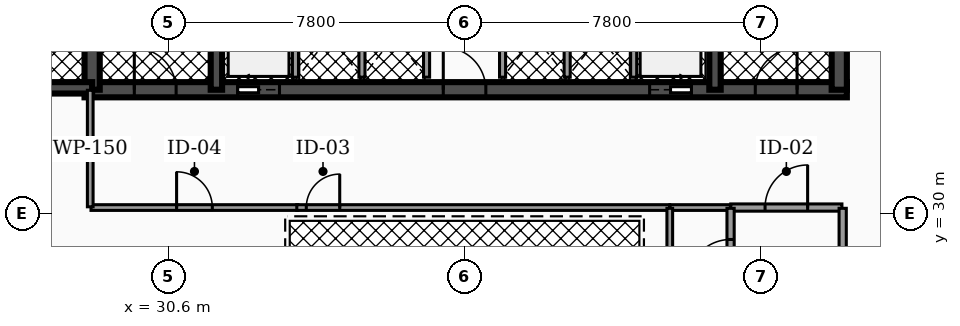
"""IFC4 building model, lengths in metres.
Left out: names, types, materials, properties, quantities, classifications, styles, units other than length and angle.
Written with IfcOpenShell. Run it as: python <this file> out.ifc"""

import sys

from ifc_helpers import new_model, si_unit, direction, frame, frame_2d, origin, place, context, subcontext, project, spatial, rectangle, extrude, element, fill, save


model = new_model("IFC4")
c1 = context("Model", 3, precision=1e-05, world=origin(), true_north=direction((0.0, 1.0)))
c2 = subcontext(c1, "Body", "Model", "MODEL_VIEW")
j1 = project(units=[si_unit("LENGTHUNIT", "METRE"), si_unit("PLANEANGLEUNIT", "RADIAN")], contexts=[c1])
p1 = place(None, origin())
s1 = spatial("IfcSite", under=j1, at=p1, CompositionType="ELEMENT")
p2 = place(p1, origin())
s2 = spatial("IfcBuilding", under=s1, at=p2, CompositionType="ELEMENT")
p3 = place(p2, frame((0.0, 0.0, 96.9)))
s3 = spatial("IfcBuildingStorey", under=s2, at=p3, CompositionType="ELEMENT", Elevation=96.9)
p4 = place(p3, frame((28.4, 33.25, 0.0), z_axis=(0.0, 0.0, 1.0), x_axis=(1.0, 0.0, 0.0)))
e1 = element("IfcWall", 1, at=p4, inside=s3, PredefinedType="SHEAR", context=c2, shape_type="SweptSolid", body=[
    extrude(rectangle(XDim=20.06, YDim=0.4, at=frame_2d((10.03, 0.0))), origin(), (0.0, 0.0, 1.0), 3.82),
])
p5 = place(p4, frame((4.03, 0.0, 0.0)))
e2 = element("IfcOpeningElement", 2, at=p5, cuts=e1, PredefinedType="OPENING", context=c2, shape_type="SweptSolid", body=[
    extrude(rectangle(XDim=1.1, YDim=2.15, at=frame_2d((0.55, 1.075))), frame((0.0, 0.21, 0.0), z_axis=(0.0, -1.0, 0.0), x_axis=(1.0, 0.0, 0.0)), (0.0, 0.0, 1.0), 0.42),
])
p6 = place(p4, frame((14.87, 0.0, 0.0)))
e3 = element("IfcOpeningElement", 3, at=p6, cuts=e1, PredefinedType="OPENING", context=c2, shape_type="SweptSolid", body=[
    extrude(rectangle(XDim=1.1, YDim=2.15, at=frame_2d((0.55, 1.075))), frame((0.0, 0.21, 0.0), z_axis=(0.0, -1.0, 0.0), x_axis=(1.0, 0.0, 0.0)), (0.0, 0.0, 1.0), 0.42),
])
p7 = place(p4, frame((1.31, 0.0, 0.0)))
e4 = element("IfcOpeningElement", 4, at=p7, cuts=e1, PredefinedType="OPENING", context=c2, shape_type="SweptSolid", body=[
    extrude(rectangle(XDim=1.1, YDim=2.2, at=frame_2d((0.55, 1.1))), frame((0.0, 0.21, 0.0), z_axis=(0.0, -1.0, 0.0), x_axis=(1.0, 0.0, 0.0)), (0.0, 0.0, 1.0), 0.42),
])
p8 = place(p4, frame((9.44, 0.0, 0.0)))
e5 = element("IfcOpeningElement", 5, at=p8, cuts=e1, PredefinedType="OPENING", context=c2, shape_type="SweptSolid", body=[
    extrude(rectangle(XDim=1.12, YDim=2.05, at=frame_2d((0.56, 1.025))), frame((0.0, 0.21, 0.0), z_axis=(0.0, -1.0, 0.0), x_axis=(1.0, 0.0, 0.0)), (0.0, 0.0, 1.0), 0.42),
])
p9 = place(p4, frame((17.65, 0.0, 0.0)))
e6 = element("IfcOpeningElement", 6, at=p9, cuts=e1, PredefinedType="OPENING", context=c2, shape_type="SweptSolid", body=[
    extrude(rectangle(XDim=1.1, YDim=2.2, at=frame_2d((0.55, 1.1))), frame((0.0, 0.21, 0.0), z_axis=(0.0, -1.0, 0.0), x_axis=(1.0, 0.0, 0.0)), (0.0, 0.0, 1.0), 0.42),
])
p10 = place(p3, frame((28.6, 33.25, 0.0), z_axis=(0.0, 0.0, 1.0), x_axis=(0.0, 1.0, 0.0)))
e7 = element("IfcWall", 7, at=p10, inside=s3, PredefinedType="SHEAR", context=c2, shape_type="SweptSolid", body=[
    extrude(rectangle(XDim=10.2, YDim=0.4, at=frame_2d((5.1, 0.0))), origin(), (0.0, 0.0, 1.0), 3.82),
])
for number, where, z_axis, x_axis in (
    (8, (31.87, 33.25, 0.0), (0.0, 0.0, 1.0), (0.0, 1.0, 0.0)),
    (9, (44.99, 33.25, 0.0), (0.0, 0.0, 1.0), (0.0, 1.0, 0.0)),
):
    element("IfcWall", number, at=place(p3, frame(where, z_axis=z_axis, x_axis=x_axis)), inside=s3, PredefinedType="SHEAR", context=c2, shape_type="SweptSolid", body=[
        extrude(rectangle(XDim=10.2, YDim=0.3, at=frame_2d((5.1, 0.0))), origin(), (0.0, 0.0, 1.0), 3.82),
    ])
p11 = place(p3, frame((48.26, 33.25, 0.0), z_axis=(0.0, 0.0, 1.0), x_axis=(0.0, 1.0, 0.0)))
e10 = element("IfcWall", 10, at=p11, inside=s3, PredefinedType="SHEAR", context=c2, shape_type="SweptSolid", body=[
    extrude(rectangle(XDim=10.2, YDim=0.4, at=frame_2d((5.1, 0.0))), origin(), (0.0, 0.0, 1.0), 3.82),
])
p12 = place(p3, frame((25.08, 33.3, 0.0), z_axis=(0.0, 0.0, 1.0), x_axis=(1.0, 0.0, 0.0)))
e11 = element("IfcWall", 11, at=p12, inside=s3, PredefinedType="SHEAR", context=c2, shape_type="SweptSolid", body=[
    extrude(rectangle(XDim=3.52, YDim=0.3, at=frame_2d((1.76, 0.0))), origin(), (0.0, 0.0, 1.0), 3.82),
])
p13 = place(p12, frame((1.335, 0.0, 0.0)))
e12 = element("IfcOpeningElement", 12, at=p13, cuts=e11, PredefinedType="OPENING", context=c2, shape_type="SweptSolid", body=[
    extrude(rectangle(XDim=0.95, YDim=2.2, at=frame_2d((0.475, 1.1))), frame((0.0, 0.16, 0.0), z_axis=(0.0, -1.0, 0.0), x_axis=(1.0, 0.0, 0.0)), (0.0, 0.0, 1.0), 0.32),
])
for number, where, z_axis, x_axis in (
    (13, (33.95, 33.58, 0.0), (0.0, 0.0, 1.0), (0.0, 1.0, 0.0)),
    (14, (42.85, 33.58, 0.0), (0.0, 0.0, 1.0), (0.0, 1.0, 0.0)),
):
    element("IfcWall", number, at=place(p3, frame(where, z_axis=z_axis, x_axis=x_axis)), inside=s3, PredefinedType="SOLIDWALL", context=c2, shape_type="SweptSolid", body=[
        extrude(rectangle(XDim=2.45, YDim=0.16, at=frame_2d((1.225, 0.0))), origin(), (0.0, 0.0, 1.0), 2.792),
    ])
for number, where, z_axis, x_axis in (
    (15, (35.7, 33.58, 0.0), (0.0, 0.0, 1.0), (0.0, 1.0, 0.0)),
    (16, (37.4, 33.58, 0.0), (0.0, 0.0, 1.0), (0.0, 1.0, 0.0)),
    (17, (39.4, 33.58, 0.0), (0.0, 0.0, 1.0), (0.0, 1.0, 0.0)),
    (18, (41.1, 33.58, 0.0), (0.0, 0.0, 1.0), (0.0, 1.0, 0.0)),
):
    element("IfcWall", number, at=place(p3, frame(where, z_axis=z_axis, x_axis=x_axis)), inside=s3, PredefinedType="SOLIDWALL", context=c2, shape_type="SweptSolid", body=[
        extrude(rectangle(XDim=2.25, YDim=0.16, at=frame_2d((1.125, 0.0))), origin(), (0.0, 0.0, 1.0), 2.792),
    ])
p14 = place(p3, frame((45.405, 30.15, 0.0), z_axis=(0.0, 0.0, 1.0), x_axis=(1.0, 0.0, 0.0)))
e19 = element("IfcWall", 19, at=p14, inside=s3, PredefinedType="PARTITIONING", context=c2, shape_type="SweptSolid", body=[
    extrude(rectangle(XDim=2.925, YDim=0.19, at=frame_2d((1.462, 0.0))), origin(), (0.0, 0.0, 1.0), 2.777),
])
p15 = place(p14, frame((0.903, 0.0, 0.0)))
e20 = element("IfcOpeningElement", 20, at=p15, cuts=e19, PredefinedType="OPENING", context=c2, shape_type="SweptSolid", body=[
    extrude(rectangle(XDim=1.12, YDim=2.05, at=frame_2d((0.56, 1.025))), frame((0.0, 0.105, 0.0), z_axis=(0.0, -1.0, 0.0), x_axis=(1.0, 0.0, 0.0)), (0.0, 0.0, 1.0), 0.21),
])
p16 = place(p3, frame((43.805, 30.15, 0.0), z_axis=(0.0, 0.0, 1.0), x_axis=(1.0, 0.0, 0.0)))
e21 = element("IfcWall", 21, at=p16, inside=s3, PredefinedType="PARTITIONING", context=c2, shape_type="SweptSolid", body=[
    extrude(rectangle(XDim=1.59, YDim=0.15, at=frame_2d((0.795, 0.0))), origin(), (0.0, 0.0, 1.0), 2.777),
])
p17 = place(p3, frame((28.57, 30.15, 0.0), z_axis=(0.0, 0.0, 1.0), x_axis=(1.0, 0.0, 0.0)))
e22 = element("IfcWall", 22, at=p17, inside=s3, PredefinedType="PARTITIONING", context=c2, shape_type="SweptSolid", body=[
    extrude(rectangle(XDim=5.445, YDim=0.15, at=frame_2d((2.722, 0.0))), origin(), (0.0, 0.0, 1.0), 2.777),
])
p18 = place(p17, frame((2.252, 0.0, 0.0)))
e23 = element("IfcOpeningElement", 23, at=p18, cuts=e22, PredefinedType="OPENING", context=c2, shape_type="SweptSolid", body=[
    extrude(rectangle(XDim=0.94, YDim=2.05, at=frame_2d((0.47, 1.025))), frame((0.0, 0.085, 0.0), z_axis=(0.0, -1.0, 0.0), x_axis=(1.0, 0.0, 0.0)), (0.0, 0.0, 1.0), 0.17),
])
p19 = place(p3, frame((28.55, 30.17, 0.0), z_axis=(0.0, 0.0, 1.0), x_axis=(0.0, 1.0, 0.0)))
e24 = element("IfcWall", 24, at=p19, inside=s3, PredefinedType="PARTITIONING", context=c2, shape_type="SweptSolid", body=[
    extrude(rectangle(XDim=3.065, YDim=0.15, at=frame_2d((1.533, 0.0))), origin(), (0.0, 0.0, 1.0), 2.777),
])
p20 = place(p3, frame((33.985, 30.15, 0.0), z_axis=(0.0, 0.0, 1.0), x_axis=(1.0, 0.0, 0.0)))
e25 = element("IfcWall", 25, at=p20, inside=s3, PredefinedType="PARTITIONING", context=c2, shape_type="SweptSolid", body=[
    extrude(rectangle(XDim=9.81, YDim=0.15, at=frame_2d((4.905, 0.0))), origin(), (0.0, 0.0, 1.0), 2.777),
])
p21 = place(p20, frame((0.25, 0.0, 0.0)))
e26 = element("IfcOpeningElement", 26, at=p21, cuts=e25, PredefinedType="OPENING", context=c2, shape_type="SweptSolid", body=[
    extrude(rectangle(XDim=0.88, YDim=2.05, at=frame_2d((0.44, 1.025))), frame((0.0, 0.085, 0.0), z_axis=(0.0, -1.0, 0.0), x_axis=(1.0, 0.0, 0.0)), (0.0, 0.0, 1.0), 0.17),
])
p22 = place(p3, frame((45.4, 27.37, 0.0), z_axis=(0.0, 0.0, 1.0), x_axis=(0.0, 1.0, 0.0)))
e27 = element("IfcWall", 27, at=p22, inside=s3, PredefinedType="PARTITIONING", context=c2, shape_type="SweptSolid", body=[
    extrude(rectangle(XDim=2.76, YDim=0.19, at=frame_2d((1.38, 0.0))), origin(), (0.0, 0.0, 1.0), 2.777),
])
p23 = place(p22, frame((0.82, 0.0, 0.0)))
e28 = element("IfcOpeningElement", 28, at=p23, cuts=e27, PredefinedType="OPENING", context=c2, shape_type="SweptSolid", body=[
    extrude(rectangle(XDim=1.12, YDim=2.05, at=frame_2d((0.56, 1.025))), frame((0.0, 0.105, 0.0), z_axis=(0.0, -1.0, 0.0), x_axis=(1.0, 0.0, 0.0)), (0.0, 0.0, 1.0), 0.21),
])
p24 = place(p3, frame((48.35, 27.37, 0.0), z_axis=(0.0, 0.0, 1.0), x_axis=(0.0, 1.0, 0.0)))
e29 = element("IfcWall", 29, at=p24, inside=s3, PredefinedType="PARTITIONING", context=c2, shape_type="SweptSolid", body=[
    extrude(rectangle(XDim=2.76, YDim=0.19, at=frame_2d((1.38, 0.0))), origin(), (0.0, 0.0, 1.0), 2.777),
])
p25 = place(p3, frame((43.8, 23.62, 0.0), z_axis=(0.0, 0.0, 1.0), x_axis=(0.0, 1.0, 0.0)))
e30 = element("IfcWall", 30, at=p25, inside=s3, PredefinedType="PARTITIONING", context=c2, shape_type="SweptSolid", body=[
    extrude(rectangle(XDim=6.51, YDim=0.15, at=frame_2d((3.255, 0.0))), origin(), (0.0, 0.0, 1.0), 2.777),
])
p26 = place(p5, origin())
e31 = element("IfcDoor", 31, at=p26, inside=s3, OperationType="SLIDING_TO_LEFT", PredefinedType="DOOR", context=c2, shape_type="SweptSolid", body=[
    extrude(rectangle(XDim=1.1, YDim=2.15, at=frame_2d((0.55, 1.075))), frame((0.0, 0.025, 0.0), z_axis=(0.0, -1.0, 0.0), x_axis=(1.0, 0.0, 0.0)), (0.0, 0.0, 1.0), 0.05),
])
fill(e2, e31)
p27 = place(p6, origin())
e32 = element("IfcDoor", 32, at=p27, inside=s3, OperationType="SLIDING_TO_RIGHT", PredefinedType="DOOR", context=c2, shape_type="SweptSolid", body=[
    extrude(rectangle(XDim=1.1, YDim=2.15, at=frame_2d((0.55, 1.075))), frame((0.0, 0.025, 0.0), z_axis=(0.0, -1.0, 0.0), x_axis=(1.0, 0.0, 0.0)), (0.0, 0.0, 1.0), 0.05),
])
fill(e3, e32)
p28 = place(p7, origin())
e33 = element("IfcDoor", 33, at=p28, inside=s3, OperationType="SINGLE_SWING_LEFT", PredefinedType="DOOR", context=c2, shape_type="SweptSolid", body=[
    extrude(rectangle(XDim=1.1, YDim=2.2, at=frame_2d((0.55, 1.1))), frame((0.0, 0.025, 0.0), z_axis=(0.0, -1.0, 0.0), x_axis=(1.0, 0.0, 0.0)), (0.0, 0.0, 1.0), 0.05),
])
fill(e4, e33)
p29 = place(p8, origin())
e34 = element("IfcDoor", 34, at=p29, inside=s3, OperationType="SINGLE_SWING_LEFT", PredefinedType="DOOR", context=c2, shape_type="SweptSolid", body=[
    extrude(rectangle(XDim=1.12, YDim=2.05, at=frame_2d((0.56, 1.025))), frame((0.0, 0.025, 0.0), z_axis=(0.0, -1.0, 0.0), x_axis=(1.0, 0.0, 0.0)), (0.0, 0.0, 1.0), 0.05),
])
fill(e5, e34)
p30 = place(p9, origin())
e35 = element("IfcDoor", 35, at=p30, inside=s3, OperationType="SINGLE_SWING_RIGHT", PredefinedType="DOOR", context=c2, shape_type="SweptSolid", body=[
    extrude(rectangle(XDim=1.1, YDim=2.2, at=frame_2d((0.55, 1.1))), frame((0.0, 0.025, 0.0), z_axis=(0.0, -1.0, 0.0), x_axis=(1.0, 0.0, 0.0)), (0.0, 0.0, 1.0), 0.05),
])
fill(e6, e35)
p31 = place(p15, origin())
e36 = element("IfcDoor", 36, at=p31, inside=s3, OperationType="SINGLE_SWING_RIGHT", PredefinedType="DOOR", context=c2, shape_type="SweptSolid", body=[
    extrude(rectangle(XDim=1.12, YDim=2.05, at=frame_2d((0.56, 1.025))), frame((0.0, 0.025, 0.0), z_axis=(0.0, -1.0, 0.0), x_axis=(1.0, 0.0, 0.0)), (0.0, 0.0, 1.0), 0.05),
])
fill(e20, e36)
p32 = place(p18, origin())
e37 = element("IfcDoor", 37, at=p32, inside=s3, OperationType="SINGLE_SWING_LEFT", PredefinedType="DOOR", context=c2, shape_type="SweptSolid", body=[
    extrude(rectangle(XDim=0.94, YDim=2.05, at=frame_2d((0.47, 1.025))), frame((0.0, 0.025, 0.0), z_axis=(0.0, -1.0, 0.0), x_axis=(1.0, 0.0, 0.0)), (0.0, 0.0, 1.0), 0.05),
])
fill(e23, e37)
p33 = place(p21, origin())
e38 = element("IfcDoor", 38, at=p33, inside=s3, OperationType="SINGLE_SWING_RIGHT", PredefinedType="DOOR", context=c2, shape_type="SweptSolid", body=[
    extrude(rectangle(XDim=0.88, YDim=2.05, at=frame_2d((0.44, 1.025))), frame((0.0, 0.025, 0.0), z_axis=(0.0, -1.0, 0.0), x_axis=(1.0, 0.0, 0.0)), (0.0, 0.0, 1.0), 0.05),
])
fill(e26, e38)
p34 = place(p23, origin())
e39 = element("IfcDoor", 39, at=p34, inside=s3, OperationType="SINGLE_SWING_LEFT", PredefinedType="DOOR", context=c2, shape_type="SweptSolid", body=[
    extrude(rectangle(XDim=1.12, YDim=2.05, at=frame_2d((0.56, 1.025))), frame((0.0, 0.025, 0.0), z_axis=(0.0, -1.0, 0.0), x_axis=(1.0, 0.0, 0.0)), (0.0, 0.0, 1.0), 0.05),
])
fill(e28, e39)
save(model, sys.argv[1])
